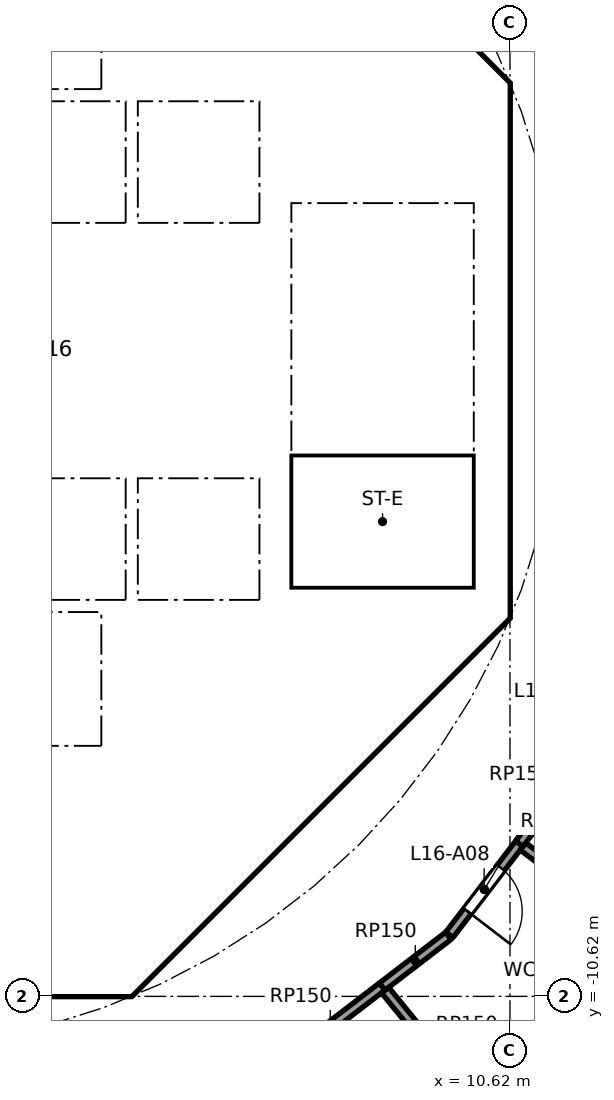
"""IFC4 building model, lengths in metres.
Left out: names, types, materials, properties, quantities, classifications, styles, units other than length and angle.
Written with IfcOpenShell. Run it as: python <this file> out.ifc"""

import sys

from ifc_helpers import new_model, si_unit, direction, frame, frame_2d, origin, place, context, subcontext, project, spatial, polyline, rectangle, outline, extrude, element, fill, save


model = new_model("IFC4")
c1 = context("Model", 3, precision=1e-05, world=origin(), true_north=direction((0.0, 1.0)))
c2 = subcontext(c1, "Body", "Model", "MODEL_VIEW")
j1 = project(units=[si_unit("LENGTHUNIT", "METRE"), si_unit("PLANEANGLEUNIT", "RADIAN")], contexts=[c1])
p1 = place(None, origin())
s1 = spatial("IfcSite", under=j1, at=p1, CompositionType="ELEMENT")
p2 = place(p1, origin())
s2 = spatial("IfcBuilding", under=s1, at=p2, CompositionType="ELEMENT")
p3 = place(p2, frame((0.0, 0.0, 67.7)))
s3 = spatial("IfcBuildingStorey", under=s2, at=p3, CompositionType="ELEMENT", Elevation=67.7)
p4 = place(p3, frame((9.988, 4.613, 0.0), z_axis=(0.0, 0.0, 1.0), x_axis=(-0.707106781187, 0.707106781187, 0.0)))
e1 = element("IfcWall", 1, at=p4, inside=s3, PredefinedType="SHEAR", context=c2, shape_type="SweptSolid", body=[
    extrude(rectangle(XDim=7.602, YDim=0.6, at=frame_2d((3.801, 0.0))), origin(), (0.0, 0.0, 1.0), 5.34),
])
p5 = place(p4, frame((3.201, 0.0, 0.0)))
e2 = element("IfcOpeningElement", 2, at=p5, cuts=e1, PredefinedType="OPENING", context=c2, shape_type="SweptSolid", body=[
    extrude(rectangle(XDim=1.2, YDim=2.1, at=frame_2d((0.6, 1.05))), frame((0.0, 0.31, 0.0), z_axis=(0.0, -1.0, 0.0), x_axis=(1.0, 0.0, 0.0)), (0.0, 0.0, 1.0), 0.62),
])
p6 = place(p3, frame((4.613, -9.988, 0.0), z_axis=(0.0, 0.0, 1.0), x_axis=(0.707106781187, 0.707106781187, 0.0)))
e3 = element("IfcWall", 3, at=p6, inside=s3, PredefinedType="SHEAR", context=c2, shape_type="SweptSolid", body=[
    extrude(rectangle(XDim=7.602, YDim=0.6, at=frame_2d((3.801, 0.0))), origin(), (0.0, 0.0, 1.0), 5.34),
])
p7 = place(p6, frame((3.201, 0.0, 0.0)))
e4 = element("IfcOpeningElement", 4, at=p7, cuts=e3, PredefinedType="OPENING", context=c2, shape_type="SweptSolid", body=[
    extrude(rectangle(XDim=1.2, YDim=2.1, at=frame_2d((0.6, 1.05))), frame((0.0, 0.31, 0.0), z_axis=(0.0, -1.0, 0.0), x_axis=(1.0, 0.0, 0.0)), (0.0, 0.0, 1.0), 0.62),
])
p8 = place(p3, frame((4.0, 4.3, 0.0), z_axis=(0.0, 0.0, 1.0), x_axis=(0.0, 1.0, 0.0)))
e5 = element("IfcWall", 5, at=p8, inside=s3, PredefinedType="SOLIDWALL", context=c2, shape_type="SweptSolid", body=[
    extrude(rectangle(XDim=2.2, YDim=0.2, at=frame_2d((1.1, 0.0))), origin(), (0.0, 0.0, 1.0), 5.34),
])
p9 = place(p8, frame((0.55, 0.0, 0.0)))
e6 = element("IfcOpeningElement", 6, at=p9, cuts=e5, PredefinedType="OPENING", context=c2, shape_type="SweptSolid", body=[
    extrude(rectangle(XDim=1.1, YDim=2.1, at=frame_2d((0.55, 1.05))), frame((0.0, 0.11, 0.0), z_axis=(0.0, -1.0, 0.0), x_axis=(1.0, 0.0, 0.0)), (0.0, 0.0, 1.0), 0.22),
])
p10 = place(p3, frame((-6.7, 2.0, 0.0), z_axis=(0.0, 0.0, 1.0), x_axis=(1.0, 0.0, 0.0)))
e7 = element("IfcWall", 7, at=p10, inside=s3, PredefinedType="SOLIDWALL", context=c2, shape_type="SweptSolid", body=[
    extrude(rectangle(XDim=13.4, YDim=0.2, at=frame_2d((6.7, 0.0))), origin(), (0.0, 0.0, 1.0), 5.34),
])
p11 = place(p10, frame((0.65, 0.0, 0.0)))
e8 = element("IfcOpeningElement", 8, at=p11, cuts=e7, PredefinedType="OPENING", context=c2, shape_type="SweptSolid", body=[
    extrude(rectangle(XDim=1.1, YDim=2.1, at=frame_2d((0.55, 1.05))), frame((0.0, 0.11, 0.0), z_axis=(0.0, -1.0, 0.0), x_axis=(1.0, 0.0, 0.0)), (0.0, 0.0, 1.0), 0.22),
])
p12 = place(p10, frame((2.85, 0.0, 0.0)))
e9 = element("IfcOpeningElement", 9, at=p12, cuts=e7, PredefinedType="OPENING", context=c2, shape_type="SweptSolid", body=[
    extrude(rectangle(XDim=1.1, YDim=2.1, at=frame_2d((0.55, 1.05))), frame((0.0, 0.11, 0.0), z_axis=(0.0, -1.0, 0.0), x_axis=(1.0, 0.0, 0.0)), (0.0, 0.0, 1.0), 0.22),
])
p13 = place(p10, frame((5.05, 0.0, 0.0)))
e10 = element("IfcOpeningElement", 10, at=p13, cuts=e7, PredefinedType="OPENING", context=c2, shape_type="SweptSolid", body=[
    extrude(rectangle(XDim=1.1, YDim=2.1, at=frame_2d((0.55, 1.05))), frame((0.0, 0.11, 0.0), z_axis=(0.0, -1.0, 0.0), x_axis=(1.0, 0.0, 0.0)), (0.0, 0.0, 1.0), 0.22),
])
p14 = place(p3, frame((6.7, 4.0, 0.0), z_axis=(0.0, 0.0, 1.0), x_axis=(1.0, 0.0, 0.0)))
e11 = element("IfcWall", 11, at=p14, inside=s3, PredefinedType="SOLIDWALL", context=c2, shape_type="SweptSolid", body=[
    extrude(rectangle(XDim=3.325, YDim=0.2, at=frame_2d((1.662, 0.0))), origin(), (0.0, 0.0, 1.0), 5.34),
])
p15 = place(p14, frame((1.25, 0.0, 0.0)))
e12 = element("IfcOpeningElement", 12, at=p15, cuts=e11, PredefinedType="OPENING", context=c2, shape_type="SweptSolid", body=[
    extrude(rectangle(XDim=1.1, YDim=2.1, at=frame_2d((0.55, 1.05))), frame((0.0, 0.11, 0.0), z_axis=(0.0, -1.0, 0.0), x_axis=(1.0, 0.0, 0.0)), (0.0, 0.0, 1.0), 0.22),
])
p16 = place(p3, frame((4.0, -10.025, 0.0), z_axis=(0.0, 0.0, 1.0), x_axis=(0.0, 1.0, 0.0)))
e13 = element("IfcWall", 13, at=p16, inside=s3, PredefinedType="SOLIDWALL", context=c2, shape_type="SweptSolid", body=[
    extrude(rectangle(XDim=3.0, YDim=0.2, at=frame_2d((1.5, 0.0))), origin(), (0.0, 0.0, 1.0), 5.34),
])
p17 = place(p16, frame((0.975, 0.0, 0.0)))
e14 = element("IfcOpeningElement", 14, at=p17, cuts=e13, PredefinedType="OPENING", context=c2, shape_type="SweptSolid", body=[
    extrude(rectangle(XDim=1.1, YDim=2.1, at=frame_2d((0.55, 1.05))), frame((0.0, 0.11, 0.0), z_axis=(0.0, -1.0, 0.0), x_axis=(1.0, 0.0, 0.0)), (0.0, 0.0, 1.0), 0.22),
])
p18 = place(p3, frame((4.0, -6.5, 0.0), z_axis=(0.0, 0.0, 1.0), x_axis=(0.0, 1.0, 0.0)))
e15 = element("IfcWall", 15, at=p18, inside=s3, PredefinedType="SOLIDWALL", context=c2, shape_type="SweptSolid", body=[
    extrude(rectangle(XDim=2.2, YDim=0.2, at=frame_2d((1.1, 0.0))), origin(), (0.0, 0.0, 1.0), 5.34),
])
p19 = place(p18, frame((0.55, 0.0, 0.0)))
e16 = element("IfcOpeningElement", 16, at=p19, cuts=e15, PredefinedType="OPENING", context=c2, shape_type="SweptSolid", body=[
    extrude(rectangle(XDim=1.1, YDim=2.1, at=frame_2d((0.55, 1.05))), frame((0.0, 0.11, 0.0), z_axis=(0.0, -1.0, 0.0), x_axis=(1.0, 0.0, 0.0)), (0.0, 0.0, 1.0), 0.22),
])
p20 = place(p3, frame((-6.7, -2.0, 0.0), z_axis=(0.0, 0.0, 1.0), x_axis=(1.0, 0.0, 0.0)))
e17 = element("IfcWall", 17, at=p20, inside=s3, PredefinedType="SOLIDWALL", context=c2, shape_type="SweptSolid", body=[
    extrude(rectangle(XDim=13.4, YDim=0.2, at=frame_2d((6.7, 0.0))), origin(), (0.0, 0.0, 1.0), 5.34),
])
p21 = place(p20, frame((0.65, 0.0, 0.0)))
e18 = element("IfcOpeningElement", 18, at=p21, cuts=e17, PredefinedType="OPENING", context=c2, shape_type="SweptSolid", body=[
    extrude(rectangle(XDim=1.1, YDim=2.1, at=frame_2d((0.55, 1.05))), frame((0.0, 0.11, 0.0), z_axis=(0.0, -1.0, 0.0), x_axis=(1.0, 0.0, 0.0)), (0.0, 0.0, 1.0), 0.22),
])
p22 = place(p20, frame((2.85, 0.0, 0.0)))
e19 = element("IfcOpeningElement", 19, at=p22, cuts=e17, PredefinedType="OPENING", context=c2, shape_type="SweptSolid", body=[
    extrude(rectangle(XDim=1.1, YDim=2.1, at=frame_2d((0.55, 1.05))), frame((0.0, 0.11, 0.0), z_axis=(0.0, -1.0, 0.0), x_axis=(1.0, 0.0, 0.0)), (0.0, 0.0, 1.0), 0.22),
])
p23 = place(p3, origin())
e20 = element("IfcWall", 20, at=p23, inside=s3, PredefinedType="SHEAR", context=c2, shape_type="SweptSolid", body=[
    extrude(outline(polyline([(-4.152, -10.025), (4.152, -10.025), (4.401, -9.776), (4.825, -10.2), (4.401, -10.625), (-4.401, -10.625), (-4.825, -10.2), (-4.401, -9.776), (-4.152, -10.025)])), origin(), (0.0, 0.0, 1.0), 5.34),
])
p24 = place(p3, origin())
e21 = element("IfcWall", 21, at=p24, inside=s3, PredefinedType="SHEAR", context=c2, shape_type="SweptSolid", body=[
    extrude(outline(polyline([(9.776, -4.401), (10.025, -4.152), (10.025, -3.801), (10.025, 4.152), (9.776, 4.401), (10.2, 4.825), (10.625, 4.401), (10.625, -4.401), (10.2, -4.825), (9.776, -4.401)])), origin(), (0.0, 0.0, 1.0), 5.34),
])
p25 = place(p3, origin())
e22 = element("IfcWall", 22, at=p25, inside=s3, PredefinedType="SOLIDWALL", context=c2, shape_type="SweptSolid", body=[
    extrude(outline(polyline([(-6.7, -2.1), (-6.5, -2.1), (-6.5, -4.1), (-4.5, -4.1), (-4.5, -2.1), (-4.3, -2.1), (-4.3, -4.1), (-2.3, -4.1), (-2.3, -2.1), (-2.1, -2.1), (-2.1, -4.1), (-0.1, -4.1), (-0.1, -2.1), (0.1, -2.1), (0.1, -4.1), (2.1, -4.1), (2.1, -2.1), (2.3, -2.1), (2.3, -4.1), (4.3, -4.1), (4.3, -2.1), (4.5, -2.1), (4.5, -4.1), (6.5, -4.1), (6.5, -2.1), (6.7, -2.1), (6.7, -4.3), (-6.7, -4.3), (-6.7, -2.1)])), origin(), (0.0, 0.0, 1.0), 5.34),
])
p26 = place(p3, origin())
e23 = element("IfcWall", 23, at=p26, inside=s3, PredefinedType="SOLIDWALL", context=c2, shape_type="SweptSolid", body=[
    extrude(outline(polyline([(-6.5, 2.1), (-6.7, 2.1), (-6.7, 4.3), (6.7, 4.3), (6.7, 2.1), (6.5, 2.1), (6.5, 4.1), (4.5, 4.1), (4.5, 2.1), (4.3, 2.1), (4.3, 4.1), (2.3, 4.1), (2.3, 2.1), (2.1, 2.1), (2.1, 4.1), (0.1, 4.1), (0.1, 2.1), (-0.1, 2.1), (-0.1, 4.1), (-2.1, 4.1), (-2.1, 2.1), (-2.3, 2.1), (-2.3, 4.1), (-4.3, 4.1), (-4.3, 2.1), (-4.5, 2.1), (-4.5, 4.1), (-6.5, 4.1), (-6.5, 2.1)])), origin(), (0.0, 0.0, 1.0), 5.34),
])
p27 = place(p3, origin())
e24 = element("IfcWall", 24, at=p27, inside=s3, PredefinedType="SOLIDWALL", context=c2, shape_type="SweptSolid", body=[
    extrude(outline(polyline([(4.1, -7.025), (-4.1, -7.025), (-4.1, -6.5), (4.1, -6.5), (4.1, -7.025)])), origin(), (0.0, 0.0, 1.0), 5.34),
])
p28 = place(p3, origin())
e25 = element("IfcWall", 25, at=p28, inside=s3, PredefinedType="SOLIDWALL", context=c2, shape_type="SweptSolid", body=[
    extrude(outline(polyline([(7.025, -3.9), (6.7, -3.9), (6.7, 3.9), (7.025, 3.9), (7.025, -3.9)])), origin(), (0.0, 0.0, 1.0), 5.34),
])
p29 = place(p3, origin())
e26 = element("IfcWall", 26, at=p29, inside=s3, PredefinedType="SOLIDWALL", context=c2, shape_type="SweptSolid", body=[
    extrude(outline(polyline([(10.025, -4.1), (6.7, -4.1), (6.7, -3.9), (10.025, -3.9), (10.025, -4.1)])), origin(), (0.0, 0.0, 1.0), 5.34),
])
p30 = place(p3, frame((8.519, -10.459, 0.0), z_axis=(0.0, 0.0, 1.0), x_axis=(-0.793372937326, -0.608735888805, 0.0)))
e27 = element("IfcWall", 27, at=p30, inside=s3, PredefinedType="PARTITIONING", context=c2, shape_type="SweptSolid", body=[
    extrude(rectangle(XDim=2.155, YDim=0.15, at=frame_2d((1.078, 0.0))), origin(), (0.0, 0.0, 1.0), 5.34),
])
p31 = place(p3, frame((8.567, -10.517, 0.0), z_axis=(0.0, 0.0, 1.0), x_axis=(0.631573271363, -0.775316195432, 0.0)))
e28 = element("IfcWall", 28, at=p31, inside=s3, PredefinedType="PARTITIONING", context=c2, shape_type="SweptSolid", body=[
    extrude(rectangle(XDim=2.726, YDim=0.15, at=frame_2d((1.363, 0.0))), origin(), (0.0, 0.0, 1.0), 5.34),
])
p32 = place(p3, frame((9.607, -9.624, 0.0), z_axis=(0.0, 0.0, 1.0), x_axis=(-0.793371316762, -0.6087380009, 0.0)))
e29 = element("IfcWall", 29, at=p32, inside=s3, PredefinedType="PARTITIONING", context=c2, shape_type="SweptSolid", body=[
    extrude(rectangle(XDim=1.371, YDim=0.15, at=frame_2d((0.686, 0.0))), origin(), (0.0, 0.0, 1.0), 5.34),
])
p33 = place(p3, frame((10.774, -8.109, 0.0), z_axis=(0.0, 0.0, 1.0), x_axis=(-0.608754453805, -0.793358692504, 0.0)))
e30 = element("IfcWall", 30, at=p33, inside=s3, PredefinedType="PARTITIONING", context=c2, shape_type="SweptSolid", body=[
    extrude(rectangle(XDim=1.888, YDim=0.15, at=frame_2d((0.944, 0.0))), origin(), (0.0, 0.0, 1.0), 5.34),
])
p34 = place(p33, frame((0.5, 0.0, 0.0)))
e31 = element("IfcOpeningElement", 31, at=p34, cuts=e30, PredefinedType="OPENING", context=c2, shape_type="SweptSolid", body=[
    extrude(rectangle(XDim=0.9, YDim=2.1, at=frame_2d((0.45, 1.05))), frame((0.0, 0.085, 0.0), z_axis=(0.0, -1.0, 0.0), x_axis=(1.0, 0.0, 0.0)), (0.0, 0.0, 1.0), 0.17),
])
p35 = place(p3, frame((10.833, -8.154, 0.0), z_axis=(0.0, 0.0, 1.0), x_axis=(0.798994468734, -0.601338373075, 0.0)))
e32 = element("IfcWall", 32, at=p35, inside=s3, PredefinedType="PARTITIONING", context=c2, shape_type="SweptSolid", body=[
    extrude(rectangle(XDim=2.8, YDim=0.15, at=frame_2d((1.4, 0.0))), origin(), (0.0, 0.0, 1.0), 5.34),
])
p36 = place(p3, frame((11.771, -6.809, 0.0), z_axis=(0.0, 0.0, 1.0), x_axis=(-0.608716251771, -0.793388003961, 0.0)))
e33 = element("IfcWall", 33, at=p36, inside=s3, PredefinedType="PARTITIONING", context=c2, shape_type="SweptSolid", body=[
    extrude(rectangle(XDim=1.638, YDim=0.15, at=frame_2d((0.819, 0.0))), origin(), (0.0, 0.0, 1.0), 5.34),
])
p37 = place(p9, origin())
e34 = element("IfcDoor", 34, at=p37, inside=s3, OperationType="DOUBLE_DOOR_SLIDING", PredefinedType="DOOR", context=c2, shape_type="SweptSolid", body=[
    extrude(rectangle(XDim=1.1, YDim=2.1, at=frame_2d((0.55, 1.05))), frame((0.0, 0.025, 0.0), z_axis=(0.0, -1.0, 0.0), x_axis=(1.0, 0.0, 0.0)), (0.0, 0.0, 1.0), 0.05),
])
fill(e6, e34)
p38 = place(p19, origin())
e35 = element("IfcDoor", 35, at=p38, inside=s3, OperationType="DOUBLE_DOOR_SLIDING", PredefinedType="DOOR", context=c2, shape_type="SweptSolid", body=[
    extrude(rectangle(XDim=1.1, YDim=2.1, at=frame_2d((0.55, 1.05))), frame((0.0, 0.025, 0.0), z_axis=(0.0, -1.0, 0.0), x_axis=(1.0, 0.0, 0.0)), (0.0, 0.0, 1.0), 0.05),
])
fill(e16, e35)
p39 = place(p15, frame((1.1, 0.0, 0.0), x_axis=(-1.0, 0.0, 0.0)))
e36 = element("IfcDoor", 36, at=p39, inside=s3, OperationType="SINGLE_SWING_LEFT", PredefinedType="DOOR", context=c2, shape_type="SweptSolid", body=[
    extrude(rectangle(XDim=1.1, YDim=2.1, at=frame_2d((0.55, 1.05))), frame((0.0, 0.025, 0.0), z_axis=(0.0, -1.0, 0.0), x_axis=(1.0, 0.0, 0.0)), (0.0, 0.0, 1.0), 0.05),
])
fill(e12, e36)
p40 = place(p17, origin())
e37 = element("IfcDoor", 37, at=p40, inside=s3, OperationType="SINGLE_SWING_LEFT", PredefinedType="DOOR", context=c2, shape_type="SweptSolid", body=[
    extrude(rectangle(XDim=1.1, YDim=2.1, at=frame_2d((0.55, 1.05))), frame((0.0, 0.025, 0.0), z_axis=(0.0, -1.0, 0.0), x_axis=(1.0, 0.0, 0.0)), (0.0, 0.0, 1.0), 0.05),
])
fill(e14, e37)
p41 = place(p7, origin())
e38 = element("IfcDoor", 38, at=p41, inside=s3, OperationType="SINGLE_SWING_LEFT", PredefinedType="DOOR", context=c2, shape_type="SweptSolid", body=[
    extrude(rectangle(XDim=1.2, YDim=2.1, at=frame_2d((0.6, 1.05))), frame((0.0, 0.025, 0.0), z_axis=(0.0, -1.0, 0.0), x_axis=(1.0, 0.0, 0.0)), (0.0, 0.0, 1.0), 0.05),
])
fill(e4, e38)
p42 = place(p34, origin())
e39 = element("IfcDoor", 39, at=p42, inside=s3, OperationType="SINGLE_SWING_RIGHT", PredefinedType="DOOR", context=c2, shape_type="SweptSolid", body=[
    extrude(rectangle(XDim=0.9, YDim=2.1, at=frame_2d((0.45, 1.05))), frame((0.0, 0.025, 0.0), z_axis=(0.0, -1.0, 0.0), x_axis=(1.0, 0.0, 0.0)), (0.0, 0.0, 1.0), 0.05),
])
fill(e31, e39)
save(model, sys.argv[1])
